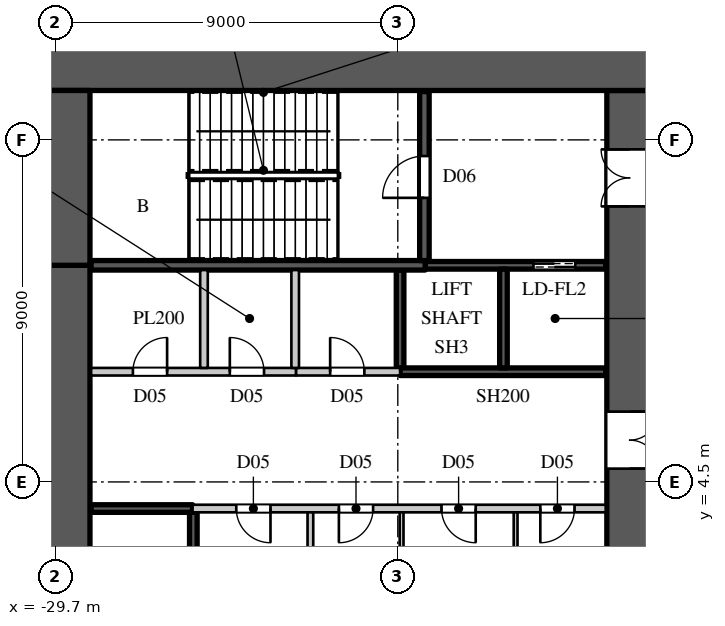
"""IFC4 building model, lengths in metres.
Left out: names, types, materials, properties, quantities, classifications, styles, units other than length and angle.
Written with IfcOpenShell. Run it as: python <this file> out.ifc"""

import sys

from ifc_helpers import new_model, si_unit, direction, frame, frame_2d, origin, place, context, subcontext, project, spatial, rectangle, extrude, element, fill, save


model = new_model("IFC4")
c1 = context("Model", 3, precision=1e-05, world=origin(), true_north=direction((0.0, 1.0)))
c2 = subcontext(c1, "Body", "Model", "MODEL_VIEW")
j1 = project(units=[si_unit("LENGTHUNIT", "METRE"), si_unit("PLANEANGLEUNIT", "RADIAN")], contexts=[c1])
p1 = place(None, origin())
s1 = spatial("IfcSite", under=j1, at=p1, CompositionType="ELEMENT")
p2 = place(p1, origin())
s2 = spatial("IfcBuilding", under=s1, at=p2, CompositionType="ELEMENT")
p3 = place(p2, frame((0.0, 0.0, 9.0)))
s3 = spatial("IfcBuildingStorey", under=s2, at=p3, CompositionType="ELEMENT", Elevation=9.0)
p4 = place(p3, frame((-30.0, 15.4, 0.0), z_axis=(0.0, 0.0, 1.0), x_axis=(1.0, 0.0, 0.0)))
e1 = element("IfcWall", 1, at=p4, inside=s3, PredefinedType="SHEAR", context=c2, shape_type="SweptSolid", body=[
    extrude(rectangle(XDim=16.0, YDim=1.2, at=frame_2d((8.0, 0.0))), origin(), (0.0, 0.0, 1.0), 10.0),
])
p5 = place(p3, frame((-14.6, -14.8, 0.0), z_axis=(0.0, 0.0, 1.0), x_axis=(0.0, 1.0, 0.0)))
e2 = element("IfcWall", 2, at=p5, inside=s3, PredefinedType="SHEAR", context=c2, shape_type="SweptSolid", body=[
    extrude(rectangle(XDim=29.6, YDim=1.2, at=frame_2d((14.8, 0.0))), origin(), (0.0, 0.0, 1.0), 10.0),
])
p6 = place(p5, frame((1.55, 0.0, 0.0)))
e3 = element("IfcOpeningElement", 3, at=p6, cuts=e2, PredefinedType="OPENING", context=c2, shape_type="SweptSolid", body=[
    extrude(rectangle(XDim=1.5, YDim=2.4, at=frame_2d((0.75, 1.2))), frame((0.0, 0.61, 0.0), z_axis=(0.0, -1.0, 0.0), x_axis=(1.0, 0.0, 0.0)), (0.0, 0.0, 1.0), 1.22),
])
p7 = place(p5, frame((26.55, 0.0, 0.0)))
e4 = element("IfcOpeningElement", 4, at=p7, cuts=e2, PredefinedType="OPENING", context=c2, shape_type="SweptSolid", body=[
    extrude(rectangle(XDim=1.5, YDim=2.4, at=frame_2d((0.75, 1.2))), frame((0.0, 0.61, 0.0), z_axis=(0.0, -1.0, 0.0), x_axis=(1.0, 0.0, 0.0)), (0.0, 0.0, 1.0), 1.22),
])
p8 = place(p5, frame((8.45, 0.0, 0.0)))
e5 = element("IfcOpeningElement", 5, at=p8, cuts=e2, PredefinedType="OPENING", context=c2, shape_type="SweptSolid", body=[
    extrude(rectangle(XDim=1.5, YDim=2.4, at=frame_2d((0.75, 1.2))), frame((0.0, 0.61, 0.0), z_axis=(0.0, -1.0, 0.0), x_axis=(1.0, 0.0, 0.0)), (0.0, 0.0, 1.0), 1.22),
])
p9 = place(p5, frame((19.65, 0.0, 0.0)))
e6 = element("IfcOpeningElement", 6, at=p9, cuts=e2, PredefinedType="OPENING", context=c2, shape_type="SweptSolid", body=[
    extrude(rectangle(XDim=1.5, YDim=2.4, at=frame_2d((0.75, 1.2))), frame((0.0, 0.61, 0.0), z_axis=(0.0, -1.0, 0.0), x_axis=(1.0, 0.0, 0.0)), (0.0, 0.0, 1.0), 1.22),
])
p10 = place(p5, frame((14.5, 0.0, 0.0)))
e7 = element("IfcOpeningElement", 7, at=p10, cuts=e2, PredefinedType="OPENING", context=c2, shape_type="SweptSolid", body=[
    extrude(rectangle(XDim=0.6, YDim=2.0, at=frame_2d((0.3, 1.0))), frame((0.0, 0.61, 0.0), z_axis=(0.0, -1.0, 0.0), x_axis=(1.0, 0.0, 0.0)), (0.0, 0.0, 1.0), 1.22),
])
p11 = place(p3, frame((-29.4, -10.2, 0.0), z_axis=(0.0, 0.0, 1.0), x_axis=(0.0, 1.0, 0.0)))
e8 = element("IfcWall", 8, at=p11, inside=s3, PredefinedType="SHEAR", context=c2, shape_type="SweptSolid", body=[
    extrude(rectangle(XDim=20.4, YDim=1.2, at=frame_2d((10.2, 0.0))), origin(), (0.0, 0.0, 1.0), 10.0),
])
p12 = place(p3, frame((-29.4, 10.2, 0.0), z_axis=(0.0, 0.0, 1.0), x_axis=(0.0, 1.0, 0.0)))
e9 = element("IfcWall", 9, at=p12, inside=s3, PredefinedType="SHEAR", context=c2, shape_type="SweptSolid", body=[
    extrude(rectangle(XDim=4.6, YDim=1.2, at=frame_2d((2.3, 0.0))), origin(), (0.0, 0.0, 1.0), 10.0),
])
p13 = place(p3, frame((-26.1, 3.8, 0.0), z_axis=(0.0, 0.0, 1.0), x_axis=(1.0, 0.0, 0.0)))
e10 = element("IfcWall", 10, at=p13, inside=s3, PredefinedType="PARTITIONING", context=c2, shape_type="SweptSolid", body=[
    extrude(rectangle(XDim=10.87, YDim=0.2, at=frame_2d((5.435, 0.0))), origin(), (0.0, 0.0, 1.0), 9.598),
])
p14 = place(p13, frame((1.15, 0.0, 0.0)))
e11 = element("IfcOpeningElement", 11, at=p14, cuts=e10, PredefinedType="OPENING", context=c2, shape_type="SweptSolid", body=[
    extrude(rectangle(XDim=0.9, YDim=2.2, at=frame_2d((0.45, 1.1))), frame((0.0, 0.11, 0.0), z_axis=(0.0, -1.0, 0.0), x_axis=(1.0, 0.0, 0.0)), (0.0, 0.0, 1.0), 0.22),
])
p15 = place(p13, frame((3.85, 0.0, 0.0)))
e12 = element("IfcOpeningElement", 12, at=p15, cuts=e10, PredefinedType="OPENING", context=c2, shape_type="SweptSolid", body=[
    extrude(rectangle(XDim=0.9, YDim=2.2, at=frame_2d((0.45, 1.1))), frame((0.0, 0.11, 0.0), z_axis=(0.0, -1.0, 0.0), x_axis=(1.0, 0.0, 0.0)), (0.0, 0.0, 1.0), 0.22),
])
p16 = place(p13, frame((6.55, 0.0, 0.0)))
e13 = element("IfcOpeningElement", 13, at=p16, cuts=e10, PredefinedType="OPENING", context=c2, shape_type="SweptSolid", body=[
    extrude(rectangle(XDim=0.9, YDim=2.2, at=frame_2d((0.45, 1.1))), frame((0.0, 0.11, 0.0), z_axis=(0.0, -1.0, 0.0), x_axis=(1.0, 0.0, 0.0)), (0.0, 0.0, 1.0), 0.22),
])
p17 = place(p13, frame((9.15, 0.0, 0.0)))
e14 = element("IfcOpeningElement", 14, at=p17, cuts=e10, PredefinedType="OPENING", context=c2, shape_type="SweptSolid", body=[
    extrude(rectangle(XDim=0.9, YDim=2.2, at=frame_2d((0.45, 1.1))), frame((0.0, 0.11, 0.0), z_axis=(0.0, -1.0, 0.0), x_axis=(1.0, 0.0, 0.0)), (0.0, 0.0, 1.0), 0.22),
])
p18 = place(p3, frame((-23.38, 7.4, 0.0), z_axis=(0.0, 0.0, 1.0), x_axis=(1.0, 0.0, 0.0)))
e15 = element("IfcWall", 15, at=p18, inside=s3, PredefinedType="PARTITIONING", context=c2, shape_type="SweptSolid", body=[
    extrude(rectangle(XDim=2.74, YDim=0.2, at=frame_2d((1.37, 0.0))), origin(), (0.0, 0.0, 1.0), 9.598),
])
p19 = place(p18, frame((0.9, 0.0, 0.0)))
e16 = element("IfcOpeningElement", 16, at=p19, cuts=e15, PredefinedType="OPENING", context=c2, shape_type="SweptSolid", body=[
    extrude(rectangle(XDim=0.9, YDim=2.2, at=frame_2d((0.45, 1.1))), frame((0.0, 0.11, 0.0), z_axis=(0.0, -1.0, 0.0), x_axis=(1.0, 0.0, 0.0)), (0.0, 0.0, 1.0), 0.22),
])
p20 = place(p3, frame((-23.0, 1.1, 0.0), z_axis=(0.0, 0.0, 1.0), x_axis=(0.0, 1.0, 0.0)))
e17 = element("IfcWall", 17, at=p20, inside=s3, PredefinedType="PARTITIONING", context=c2, shape_type="SweptSolid", body=[
    extrude(rectangle(XDim=2.6, YDim=0.15, at=frame_2d((1.3, 0.0))), origin(), (0.0, 0.0, 1.0), 9.598),
])
p21 = place(p3, frame((-28.77, 7.4, 0.0), z_axis=(0.0, 0.0, 1.0), x_axis=(1.0, 0.0, 0.0)))
e18 = element("IfcWall", 18, at=p21, inside=s3, PredefinedType="PARTITIONING", context=c2, shape_type="SweptSolid", body=[
    extrude(rectangle(XDim=5.39, YDim=0.2, at=frame_2d((2.695, 0.0))), origin(), (0.0, 0.0, 1.0), 9.598),
])
p22 = place(p21, frame((1.1, 0.0, 0.0)))
e19 = element("IfcOpeningElement", 19, at=p22, cuts=e18, PredefinedType="OPENING", context=c2, shape_type="SweptSolid", body=[
    extrude(rectangle(XDim=0.9, YDim=2.2, at=frame_2d((0.45, 1.1))), frame((0.0, 0.11, 0.0), z_axis=(0.0, -1.0, 0.0), x_axis=(1.0, 0.0, 0.0)), (0.0, 0.0, 1.0), 0.22),
])
p23 = place(p21, frame((3.65, 0.0, 0.0)))
e20 = element("IfcOpeningElement", 20, at=p23, cuts=e18, PredefinedType="OPENING", context=c2, shape_type="SweptSolid", body=[
    extrude(rectangle(XDim=0.9, YDim=2.2, at=frame_2d((0.45, 1.1))), frame((0.0, 0.11, 0.0), z_axis=(0.0, -1.0, 0.0), x_axis=(1.0, 0.0, 0.0)), (0.0, 0.0, 1.0), 0.22),
])
for number, where, z_axis, x_axis in (
    (21, (-25.8, 7.5, 0.0), (0.0, 0.0, 1.0), (0.0, 1.0, 0.0)),
    (22, (-23.4, 7.5, 0.0), (0.0, 0.0, 1.0), (0.0, 1.0, 0.0)),
):
    element("IfcWall", number, at=place(p3, frame(where, z_axis=z_axis, x_axis=x_axis)), inside=s3, PredefinedType="PARTITIONING", context=c2, shape_type="SweptSolid", body=[
        extrude(rectangle(XDim=2.575, YDim=0.2, at=frame_2d((1.288, 0.0))), origin(), (0.0, 0.0, 1.0), 9.598),
    ])
p24 = place(p3, frame((-28.77, 3.8, 0.0), z_axis=(0.0, 0.0, 1.0), x_axis=(1.0, 0.0, 0.0)))
e23 = element("IfcWall", 23, at=p24, inside=s3, PredefinedType="SHEAR", context=c2, shape_type="SweptSolid", body=[
    extrude(rectangle(XDim=2.67, YDim=0.2, at=frame_2d((1.335, 0.0))), origin(), (0.0, 0.0, 1.0), 9.598),
])
p25 = place(p3, frame((-26.08, 1.1, 0.0), z_axis=(0.0, 0.0, 1.0), x_axis=(0.0, 1.0, 0.0)))
e24 = element("IfcWall", 24, at=p25, inside=s3, PredefinedType="SHEAR", context=c2, shape_type="SweptSolid", body=[
    extrude(rectangle(XDim=2.6, YDim=0.2, at=frame_2d((1.3, 0.0))), origin(), (0.0, 0.0, 1.0), 9.598),
])
p26 = place(p3, frame((-20.64, 7.5, 0.0), z_axis=(0.0, 0.0, 1.0), x_axis=(0.0, 1.0, 0.0)))
e25 = element("IfcWall", 25, at=p26, inside=s3, PredefinedType="SHEAR", context=c2, shape_type="SweptSolid", body=[
    extrude(rectangle(XDim=2.575, YDim=0.2, at=frame_2d((1.288, 0.0))), origin(), (0.0, 0.0, 1.0), 9.598),
])
p27 = place(p3, frame((-20.64, 7.4, 0.0), z_axis=(0.0, 0.0, 1.0), x_axis=(1.0, 0.0, 0.0)))
e26 = element("IfcWall", 26, at=p27, inside=s3, PredefinedType="SHEAR", context=c2, shape_type="SweptSolid", body=[
    extrude(rectangle(XDim=5.41, YDim=0.2, at=frame_2d((2.705, 0.0))), origin(), (0.0, 0.0, 1.0), 9.598),
])
p28 = place(p3, frame((-19.98, 10.2, 0.0), z_axis=(0.0, 0.0, 1.0), x_axis=(1.0, 0.0, 0.0)))
e27 = element("IfcWall", 27, at=p28, inside=s3, PredefinedType="SHEAR", context=c2, shape_type="SweptSolid", body=[
    extrude(rectangle(XDim=4.75, YDim=0.2, at=frame_2d((2.375, 0.0))), origin(), (0.0, 0.0, 1.0), 9.598),
])
p29 = place(p28, frame((2.85, 0.0, 0.0)))
e28 = element("IfcOpeningElement", 28, at=p29, cuts=e27, PredefinedType="OPENING", context=c2, shape_type="SweptSolid", body=[
    extrude(rectangle(XDim=1.1, YDim=2.2, at=frame_2d((0.55, 1.1))), frame((0.0, 0.11, 0.0), z_axis=(0.0, -1.0, 0.0), x_axis=(1.0, 0.0, 0.0)), (0.0, 0.0, 1.0), 0.22),
])
p30 = place(p3, frame((-17.92, 7.5, 0.0), z_axis=(0.0, 0.0, 1.0), x_axis=(0.0, 1.0, 0.0)))
e29 = element("IfcWall", 29, at=p30, inside=s3, PredefinedType="SHEAR", context=c2, shape_type="SweptSolid", body=[
    extrude(rectangle(XDim=2.6, YDim=0.2, at=frame_2d((1.3, 0.0))), origin(), (0.0, 0.0, 1.0), 10.0),
])
p31 = place(p3, frame((-28.77, 10.2, 0.0), z_axis=(0.0, 0.0, 1.0), x_axis=(1.0, 0.0, 0.0)))
e30 = element("IfcWall", 30, at=p31, inside=s3, PredefinedType="SHEAR", context=c2, shape_type="SweptSolid", body=[
    extrude(rectangle(XDim=8.79, YDim=0.25, at=frame_2d((4.395, 0.0))), origin(), (0.0, 0.0, 1.0), 9.598),
])
p32 = place(p3, frame((-20.0, 10.325, 0.0), z_axis=(0.0, 0.0, 1.0), x_axis=(0.0, 1.0, 0.0)))
e31 = element("IfcWall", 31, at=p32, inside=s3, PredefinedType="SHEAR", context=c2, shape_type="SweptSolid", body=[
    extrude(rectangle(XDim=4.445, YDim=0.25, at=frame_2d((2.223, 0.0))), origin(), (0.0, 0.0, 1.0), 9.598),
])
p33 = place(p32, frame((1.65, 0.0, 0.0)))
e32 = element("IfcOpeningElement", 32, at=p33, cuts=e31, PredefinedType="OPENING", context=c2, shape_type="SweptSolid", body=[
    extrude(rectangle(XDim=1.1, YDim=2.2, at=frame_2d((0.55, 1.1))), frame((0.0, 0.135, 0.0), z_axis=(0.0, -1.0, 0.0), x_axis=(1.0, 0.0, 0.0)), (0.0, 0.0, 1.0), 0.27),
])
for number, where, z_axis, x_axis in (
    (33, (-20.6, 1.1, 0.0), (0.0, 0.0, 1.0), (0.0, 1.0, 0.0)),
    (34, (-17.6, 1.1, 0.0), (0.0, 0.0, 1.0), (0.0, 1.0, 0.0)),
):
    element("IfcWall", number, at=place(p3, frame(where, z_axis=z_axis, x_axis=x_axis)), inside=s3, PredefinedType="PARTITIONING", context=c2, shape_type="SweptSolid", body=[
        extrude(rectangle(XDim=2.6, YDim=0.1, at=frame_2d((1.3, 0.0))), origin(), (0.0, 0.0, 1.0), 9.598),
    ])
p34 = place(p33, origin())
e35 = element("IfcDoor", 35, at=p34, inside=s3, OperationType="SINGLE_SWING_LEFT", PredefinedType="DOOR", context=c2, shape_type="SweptSolid", body=[
    extrude(rectangle(XDim=1.1, YDim=2.2, at=frame_2d((0.55, 1.1))), frame((0.0, 0.025, 0.0), z_axis=(0.0, -1.0, 0.0), x_axis=(1.0, 0.0, 0.0)), (0.0, 0.0, 1.0), 0.05),
])
fill(e32, e35)
p35 = place(p14, origin())
e36 = element("IfcDoor", 36, at=p35, inside=s3, OperationType="SINGLE_SWING_LEFT", PredefinedType="DOOR", context=c2, shape_type="SweptSolid", body=[
    extrude(rectangle(XDim=0.9, YDim=2.2, at=frame_2d((0.45, 1.1))), frame((0.0, 0.025, 0.0), z_axis=(0.0, -1.0, 0.0), x_axis=(1.0, 0.0, 0.0)), (0.0, 0.0, 1.0), 0.05),
])
fill(e11, e36)
p36 = place(p15, origin())
e37 = element("IfcDoor", 37, at=p36, inside=s3, OperationType="SINGLE_SWING_RIGHT", PredefinedType="DOOR", context=c2, shape_type="SweptSolid", body=[
    extrude(rectangle(XDim=0.9, YDim=2.2, at=frame_2d((0.45, 1.1))), frame((0.0, 0.025, 0.0), z_axis=(0.0, -1.0, 0.0), x_axis=(1.0, 0.0, 0.0)), (0.0, 0.0, 1.0), 0.05),
])
fill(e12, e37)
p37 = place(p16, origin())
e38 = element("IfcDoor", 38, at=p37, inside=s3, OperationType="SINGLE_SWING_LEFT", PredefinedType="DOOR", context=c2, shape_type="SweptSolid", body=[
    extrude(rectangle(XDim=0.9, YDim=2.2, at=frame_2d((0.45, 1.1))), frame((0.0, 0.025, 0.0), z_axis=(0.0, -1.0, 0.0), x_axis=(1.0, 0.0, 0.0)), (0.0, 0.0, 1.0), 0.05),
])
fill(e13, e38)
p38 = place(p17, origin())
e39 = element("IfcDoor", 39, at=p38, inside=s3, OperationType="SINGLE_SWING_RIGHT", PredefinedType="DOOR", context=c2, shape_type="SweptSolid", body=[
    extrude(rectangle(XDim=0.9, YDim=2.2, at=frame_2d((0.45, 1.1))), frame((0.0, 0.025, 0.0), z_axis=(0.0, -1.0, 0.0), x_axis=(1.0, 0.0, 0.0)), (0.0, 0.0, 1.0), 0.05),
])
fill(e14, e39)
p39 = place(p22, origin())
e40 = element("IfcDoor", 40, at=p39, inside=s3, OperationType="SINGLE_SWING_RIGHT", PredefinedType="DOOR", context=c2, shape_type="SweptSolid", body=[
    extrude(rectangle(XDim=0.9, YDim=2.2, at=frame_2d((0.45, 1.1))), frame((0.0, 0.025, 0.0), z_axis=(0.0, -1.0, 0.0), x_axis=(1.0, 0.0, 0.0)), (0.0, 0.0, 1.0), 0.05),
])
fill(e19, e40)
p40 = place(p23, origin())
e41 = element("IfcDoor", 41, at=p40, inside=s3, OperationType="SINGLE_SWING_LEFT", PredefinedType="DOOR", context=c2, shape_type="SweptSolid", body=[
    extrude(rectangle(XDim=0.9, YDim=2.2, at=frame_2d((0.45, 1.1))), frame((0.0, 0.025, 0.0), z_axis=(0.0, -1.0, 0.0), x_axis=(1.0, 0.0, 0.0)), (0.0, 0.0, 1.0), 0.05),
])
fill(e20, e41)
p41 = place(p19, origin())
e42 = element("IfcDoor", 42, at=p41, inside=s3, OperationType="SINGLE_SWING_LEFT", PredefinedType="DOOR", context=c2, shape_type="SweptSolid", body=[
    extrude(rectangle(XDim=0.9, YDim=2.2, at=frame_2d((0.45, 1.1))), frame((0.0, 0.025, 0.0), z_axis=(0.0, -1.0, 0.0), x_axis=(1.0, 0.0, 0.0)), (0.0, 0.0, 1.0), 0.05),
])
fill(e16, e42)
p42 = place(p29, origin())
e43 = element("IfcDoor", 43, at=p42, inside=s3, OperationType="DOUBLE_DOOR_SLIDING", PredefinedType="DOOR", context=c2, shape_type="SweptSolid", body=[
    extrude(rectangle(XDim=1.1, YDim=2.2, at=frame_2d((0.55, 1.1))), frame((0.0, 0.025, 0.0), z_axis=(0.0, -1.0, 0.0), x_axis=(1.0, 0.0, 0.0)), (0.0, 0.0, 1.0), 0.05),
])
fill(e28, e43)
p43 = place(p7, origin())
e44 = element("IfcDoor", 44, at=p43, inside=s3, OperationType="DOUBLE_DOOR_SINGLE_SWING", PredefinedType="DOOR", context=c2, shape_type="SweptSolid", body=[
    extrude(rectangle(XDim=1.5, YDim=2.4, at=frame_2d((0.75, 1.2))), frame((0.0, 0.025, 0.0), z_axis=(0.0, -1.0, 0.0), x_axis=(1.0, 0.0, 0.0)), (0.0, 0.0, 1.0), 0.05),
])
fill(e4, e44)
p44 = place(p9, origin())
e45 = element("IfcDoor", 45, at=p44, inside=s3, OperationType="DOUBLE_DOOR_SINGLE_SWING", PredefinedType="DOOR", context=c2, shape_type="SweptSolid", body=[
    extrude(rectangle(XDim=1.5, YDim=2.4, at=frame_2d((0.75, 1.2))), frame((0.0, 0.025, 0.0), z_axis=(0.0, -1.0, 0.0), x_axis=(1.0, 0.0, 0.0)), (0.0, 0.0, 1.0), 0.05),
])
fill(e6, e45)
save(model, sys.argv[1])
